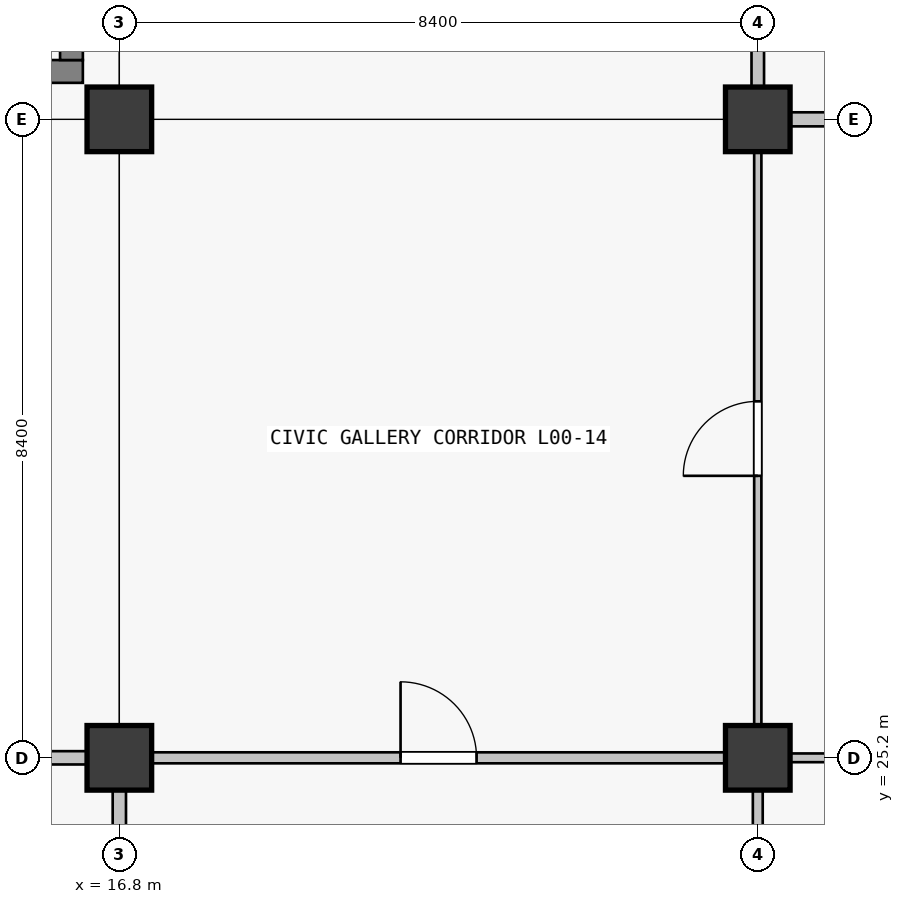
"""IFC4 building model, lengths in metres.
Left out: names, types, materials, properties, quantities, classifications, styles, units other than length and angle.
Written with IfcOpenShell. Run it as: python <this file> out.ifc"""

import sys

from ifc_helpers import new_model, si_unit, direction, frame, frame_2d, origin, origin_2d, place, context, subcontext, project, spatial, rectangle, extrude, element, fill, save


model = new_model("IFC4")
c1 = context("Model", 3, precision=1e-05, world=origin(), true_north=direction((0.0, 1.0)))
c2 = subcontext(c1, "Body", "Model", "MODEL_VIEW")
j1 = project(units=[si_unit("LENGTHUNIT", "METRE"), si_unit("PLANEANGLEUNIT", "RADIAN")], contexts=[c1])
p1 = place(None, origin())
s1 = spatial("IfcSite", under=j1, at=p1, CompositionType="ELEMENT")
p2 = place(p1, origin())
s2 = spatial("IfcBuilding", under=s1, at=p2, CompositionType="ELEMENT")
p3 = place(p2, origin())
s3 = spatial("IfcBuildingStorey", under=s2, at=p3, CompositionType="ELEMENT", Elevation=0.0)
for number, where, z_axis, x_axis in (
    (1, (16.8, 25.2, 0.0), (0.0, 0.0, 1.0), (1.0, 0.0, 0.0)),
    (2, (16.8, 33.6, 0.0), (0.0, 0.0, 1.0), (1.0, 0.0, 0.0)),
    (3, (25.2, 25.2, 0.0), (0.0, 0.0, 1.0), (1.0, 0.0, 0.0)),
    (4, (25.2, 33.6, 0.0), (0.0, 0.0, 1.0), (1.0, 0.0, 0.0)),
):
    element("IfcColumn", number, at=place(p3, frame(where, z_axis=z_axis, x_axis=x_axis)), inside=s3, PredefinedType="COLUMN", context=c2, shape_type="SweptSolid", body=[
        extrude(rectangle(XDim=0.85, YDim=0.85, at=origin_2d()), origin(), (0.0, 0.0, 1.0), 5.76),
    ])
p4 = place(p3, frame((16.32, 34.23, 0.0), z_axis=(0.0, 0.0, 1.0), x_axis=(-1.0, 0.0, 0.0)))
e5 = element("IfcWall", 5, at=p4, inside=s3, PredefinedType="SHEAR", context=c2, shape_type="SweptSolid", body=[
    extrude(rectangle(XDim=7.44, YDim=0.3, at=frame_2d((3.72, 0.0))), origin(), (0.0, 0.0, 1.0), 5.76),
])
p5 = place(p4, frame((1.28, 0.0, 0.0)))
e6 = element("IfcOpeningElement", 6, at=p5, cuts=e5, PredefinedType="OPENING", context=c2, shape_type="SweptSolid", body=[
    extrude(rectangle(XDim=1.5, YDim=2.15, at=frame_2d((0.75, 1.075))), frame((0.0, 0.15, 0.0), z_axis=(0.0, -1.0, 0.0), x_axis=(1.0, 0.0, 0.0)), (0.0, 0.0, 1.0), 0.3),
])
p6 = place(p3, frame((16.17, 41.22, 0.0), z_axis=(0.0, 0.0, 1.0), x_axis=(0.0, -1.0, 0.0)))
e7 = element("IfcWall", 7, at=p6, inside=s3, PredefinedType="SHEAR", context=c2, shape_type="SweptSolid", body=[
    extrude(rectangle(XDim=6.84, YDim=0.3, at=frame_2d((3.42, 0.0))), origin(), (0.0, 0.0, 1.0), 5.76),
])
p7 = place(p3, frame((8.827, 25.2, 0.0), z_axis=(0.0, 0.0, 1.0), x_axis=(1.0, 0.0, 0.0)))
e8 = element("IfcWall", 8, at=p7, inside=s3, PredefinedType="PARTITIONING", context=c2, shape_type="SweptSolid", body=[
    extrude(rectangle(XDim=7.546, YDim=0.175, at=frame_2d((3.773, 0.0))), origin(), (0.0, 0.0, 1.0), 3.66),
])
p8 = place(p7, frame((3.253, 0.0, 0.0)))
e9 = element("IfcOpeningElement", 9, at=p8, cuts=e8, PredefinedType="OPENING", context=c2, shape_type="SweptSolid", body=[
    extrude(rectangle(XDim=1.04, YDim=2.2, at=frame_2d((0.52, 1.1))), frame((0.0, 0.087, 0.0), z_axis=(0.0, -1.0, 0.0), x_axis=(1.0, 0.0, 0.0)), (0.0, 0.0, 1.0), 0.175),
])
p9 = place(p3, frame((17.227, 25.2, 0.0), z_axis=(0.0, 0.0, 1.0), x_axis=(1.0, 0.0, 0.0)))
e10 = element("IfcWall", 10, at=p9, inside=s3, PredefinedType="PARTITIONING", context=c2, shape_type="SweptSolid", body=[
    extrude(rectangle(XDim=7.546, YDim=0.145, at=frame_2d((3.773, 0.0))), origin(), (0.0, 0.0, 1.0), 3.66),
])
p10 = place(p9, frame((3.273, 0.0, 0.0)))
e11 = element("IfcOpeningElement", 11, at=p10, cuts=e10, PredefinedType="OPENING", context=c2, shape_type="SweptSolid", body=[
    extrude(rectangle(XDim=1.0, YDim=2.2, at=frame_2d((0.5, 1.1))), frame((0.0, 0.073, 0.0), z_axis=(0.0, -1.0, 0.0), x_axis=(1.0, 0.0, 0.0)), (0.0, 0.0, 1.0), 0.145),
])
p11 = place(p3, frame((25.627, 25.2, 0.0), z_axis=(0.0, 0.0, 1.0), x_axis=(1.0, 0.0, 0.0)))
e12 = element("IfcWall", 12, at=p11, inside=s3, PredefinedType="PARTITIONING", context=c2, shape_type="SweptSolid", body=[
    extrude(rectangle(XDim=7.546, YDim=0.115, at=frame_2d((3.773, 0.0))), origin(), (0.0, 0.0, 1.0), 3.66),
])
p12 = place(p11, frame((3.288, 0.0, 0.0)))
e13 = element("IfcOpeningElement", 13, at=p12, cuts=e12, PredefinedType="OPENING", context=c2, shape_type="SweptSolid", body=[
    extrude(rectangle(XDim=0.97, YDim=2.12, at=frame_2d((0.485, 1.06))), frame((0.0, 0.058, 0.0), z_axis=(0.0, -1.0, 0.0), x_axis=(1.0, 0.0, 0.0)), (0.0, 0.0, 1.0), 0.115),
])
p13 = place(p3, frame((25.627, 33.6, 0.0), z_axis=(0.0, 0.0, 1.0), x_axis=(1.0, 0.0, 0.0)))
e14 = element("IfcWall", 14, at=p13, inside=s3, PredefinedType="PARTITIONING", context=c2, shape_type="SweptSolid", body=[
    extrude(rectangle(XDim=7.546, YDim=0.185, at=frame_2d((3.773, 0.0))), origin(), (0.0, 0.0, 1.0), 3.66),
])
p14 = place(p13, frame((3.308, 0.0, 0.0)))
e15 = element("IfcOpeningElement", 15, at=p14, cuts=e14, PredefinedType="OPENING", context=c2, shape_type="SweptSolid", body=[
    extrude(rectangle(XDim=0.93, YDim=2.12, at=frame_2d((0.465, 1.06))), frame((0.0, 0.093, 0.0), z_axis=(0.0, -1.0, 0.0), x_axis=(1.0, 0.0, 0.0)), (0.0, 0.0, 1.0), 0.185),
])
p15 = place(p3, frame((16.8, 17.227, 0.0), z_axis=(0.0, 0.0, 1.0), x_axis=(0.0, 1.0, 0.0)))
e16 = element("IfcWall", 16, at=p15, inside=s3, PredefinedType="PARTITIONING", context=c2, shape_type="SweptSolid", body=[
    extrude(rectangle(XDim=7.546, YDim=0.175, at=frame_2d((3.773, 0.0))), origin(), (0.0, 0.0, 1.0), 3.66),
])
p16 = place(p15, frame((3.313, 0.0, 0.0)))
e17 = element("IfcOpeningElement", 17, at=p16, cuts=e16, PredefinedType="OPENING", context=c2, shape_type="SweptSolid", body=[
    extrude(rectangle(XDim=0.92, YDim=2.15, at=frame_2d((0.46, 1.075))), frame((0.0, 0.087, 0.0), z_axis=(0.0, -1.0, 0.0), x_axis=(1.0, 0.0, 0.0)), (0.0, 0.0, 1.0), 0.175),
])
p17 = place(p3, frame((25.2, 17.227, 0.0), z_axis=(0.0, 0.0, 1.0), x_axis=(0.0, 1.0, 0.0)))
e18 = element("IfcWall", 18, at=p17, inside=s3, PredefinedType="MOVABLE", context=c2, shape_type="SweptSolid", body=[
    extrude(rectangle(XDim=7.546, YDim=0.13, at=frame_2d((3.773, 0.0))), origin(), (0.0, 0.0, 1.0), 3.66),
])
p18 = place(p17, frame((3.268, 0.0, 0.0)))
e19 = element("IfcOpeningElement", 19, at=p18, cuts=e18, PredefinedType="OPENING", context=c2, shape_type="SweptSolid", body=[
    extrude(rectangle(XDim=1.01, YDim=2.12, at=frame_2d((0.505, 1.06))), frame((0.0, 0.065, 0.0), z_axis=(0.0, -1.0, 0.0), x_axis=(1.0, 0.0, 0.0)), (0.0, 0.0, 1.0), 0.13),
])
p19 = place(p3, frame((25.2, 25.627, 0.0), z_axis=(0.0, 0.0, 1.0), x_axis=(0.0, 1.0, 0.0)))
e20 = element("IfcWall", 20, at=p19, inside=s3, PredefinedType="PARTITIONING", context=c2, shape_type="SweptSolid", body=[
    extrude(rectangle(XDim=7.546, YDim=0.095, at=frame_2d((3.773, 0.0))), origin(), (0.0, 0.0, 1.0), 3.66),
])
p20 = place(p19, frame((3.283, 0.0, 0.0)))
e21 = element("IfcOpeningElement", 21, at=p20, cuts=e20, PredefinedType="OPENING", context=c2, shape_type="SweptSolid", body=[
    extrude(rectangle(XDim=0.98, YDim=2.18, at=frame_2d((0.49, 1.09))), frame((0.0, 0.047, 0.0), z_axis=(0.0, -1.0, 0.0), x_axis=(1.0, 0.0, 0.0)), (0.0, 0.0, 1.0), 0.095),
])
p21 = place(p3, frame((25.2, 34.027, 0.0), z_axis=(0.0, 0.0, 1.0), x_axis=(0.0, 1.0, 0.0)))
e22 = element("IfcWall", 22, at=p21, inside=s3, PredefinedType="PARTITIONING", context=c2, shape_type="SweptSolid", body=[
    extrude(rectangle(XDim=7.546, YDim=0.165, at=frame_2d((3.773, 0.0))), origin(), (0.0, 0.0, 1.0), 3.66),
])
p22 = place(p21, frame((3.293, 0.0, 0.0)))
e23 = element("IfcOpeningElement", 23, at=p22, cuts=e22, PredefinedType="OPENING", context=c2, shape_type="SweptSolid", body=[
    extrude(rectangle(XDim=0.96, YDim=2.18, at=frame_2d((0.48, 1.09))), frame((0.0, 0.083, 0.0), z_axis=(0.0, -1.0, 0.0), x_axis=(1.0, 0.0, 0.0)), (0.0, 0.0, 1.0), 0.165),
])
p23 = place(p10, origin())
e24 = element("IfcDoor", 24, at=p23, inside=s3, OperationType="SINGLE_SWING_LEFT", PredefinedType="DOOR", context=c2, shape_type="SweptSolid", body=[
    extrude(rectangle(XDim=1.0, YDim=2.2, at=frame_2d((0.5, 1.1))), frame((0.0, 0.025, 0.0), z_axis=(0.0, -1.0, 0.0), x_axis=(1.0, 0.0, 0.0)), (0.0, 0.0, 1.0), 0.05),
])
fill(e11, e24)
p24 = place(p20, origin())
e25 = element("IfcDoor", 25, at=p24, inside=s3, OperationType="SINGLE_SWING_LEFT", PredefinedType="DOOR", context=c2, shape_type="SweptSolid", body=[
    extrude(rectangle(XDim=0.98, YDim=2.18, at=frame_2d((0.49, 1.09))), frame((0.0, 0.025, 0.0), z_axis=(0.0, -1.0, 0.0), x_axis=(1.0, 0.0, 0.0)), (0.0, 0.0, 1.0), 0.05),
])
fill(e21, e25)
save(model, sys.argv[1])
